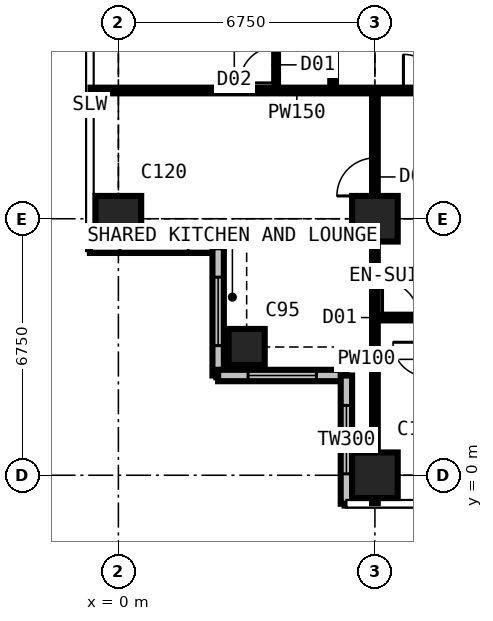
"""IFC4 building model, lengths in metres.
Left out: names, types, materials, properties, quantities, classifications, styles, units other than length and angle.
Written with IfcOpenShell. Run it as: python <this file> out.ifc"""

import sys

from ifc_helpers import new_model, si_unit, direction, frame, frame_2d, origin, origin_2d, place, context, subcontext, project, spatial, rectangle, extrude, element, fill, save


model = new_model("IFC4")
c1 = context("Model", 3, precision=1e-05, world=origin(), true_north=direction((0.0, 1.0)))
c2 = subcontext(c1, "Body", "Model", "MODEL_VIEW")
j1 = project(units=[si_unit("LENGTHUNIT", "METRE"), si_unit("PLANEANGLEUNIT", "RADIAN")], contexts=[c1])
p1 = place(None, origin())
s1 = spatial("IfcSite", under=j1, at=p1, CompositionType="ELEMENT")
p2 = place(p1, origin())
s2 = spatial("IfcBuilding", under=s1, at=p2, CompositionType="ELEMENT")
p3 = place(p2, frame((0.0, 0.0, 171.0)))
s3 = spatial("IfcBuildingStorey", under=s2, at=p3, CompositionType="ELEMENT", Elevation=171.0)
p4 = place(p3, frame((0.0, 6.75, 0.0), z_axis=(0.0, 0.0, 1.0), x_axis=(1.0, 0.0, 0.0)))
e1 = element("IfcColumn", 1, at=p4, inside=s3, PredefinedType="COLUMN", context=c2, shape_type="SweptSolid", body=[
    extrude(rectangle(XDim=1.2, YDim=1.2, at=origin_2d()), origin(), (0.0, 0.0, 1.0), 3.6),
])
p5 = place(p3, frame((3.375, 3.375, 0.0), z_axis=(0.0, 0.0, 1.0), x_axis=(1.0, 0.0, 0.0)))
e2 = element("IfcColumn", 2, at=p5, inside=s3, PredefinedType="COLUMN", context=c2, shape_type="SweptSolid", body=[
    extrude(rectangle(XDim=0.95, YDim=0.95, at=origin_2d()), origin(), (0.0, 0.0, 1.0), 3.6),
])
for number, where, z_axis, x_axis in (
    (3, (6.75, 0.0, 0.0), (0.0, 0.0, 1.0), (1.0, 0.0, 0.0)),
    (4, (6.75, 6.75, 0.0), (0.0, 0.0, 1.0), (1.0, 0.0, 0.0)),
):
    element("IfcColumn", number, at=place(p3, frame(where, z_axis=z_axis, x_axis=x_axis)), inside=s3, PredefinedType="COLUMN", context=c2, shape_type="SweptSolid", body=[
        extrude(rectangle(XDim=1.2, YDim=1.2, at=origin_2d()), origin(), (0.0, 0.0, 1.0), 3.6),
    ])
p6 = place(p3, frame((-0.75, 6.0, 0.0), z_axis=(0.0, 0.0, 1.0), x_axis=(1.0, 0.0, 0.0)))
e5 = element("IfcWall", 5, at=p6, inside=s3, PredefinedType="SOLIDWALL", context=c2, shape_type="SweptSolid", body=[
    extrude(rectangle(XDim=3.375, YDim=0.3, at=frame_2d((1.688, 0.0))), origin(), (0.0, 0.0, 1.0), 3.375),
])
p7 = place(p6, frame((0.788, 0.0, 0.6)))
e6 = element("IfcOpeningElement", 6, at=p7, cuts=e5, PredefinedType="OPENING", context=c2, shape_type="SweptSolid", body=[
    extrude(rectangle(XDim=1.8, YDim=2.1, at=frame_2d((0.9, 1.05))), frame((0.0, 0.16, 0.0), z_axis=(0.0, -1.0, 0.0), x_axis=(1.0, 0.0, 0.0)), (0.0, 0.0, 1.0), 0.32),
])
p8 = place(p3, frame((2.625, 6.0, 0.0), z_axis=(0.0, 0.0, 1.0), x_axis=(0.0, -1.0, 0.0)))
e7 = element("IfcWall", 7, at=p8, inside=s3, PredefinedType="SOLIDWALL", context=c2, shape_type="SweptSolid", body=[
    extrude(rectangle(XDim=3.375, YDim=0.3, at=frame_2d((1.688, 0.0))), origin(), (0.0, 0.0, 1.0), 3.375),
])
p9 = place(p8, frame((0.788, 0.0, 0.6)))
e8 = element("IfcOpeningElement", 8, at=p9, cuts=e7, PredefinedType="OPENING", context=c2, shape_type="SweptSolid", body=[
    extrude(rectangle(XDim=1.8, YDim=2.1, at=frame_2d((0.9, 1.05))), frame((0.0, 0.16, 0.0), z_axis=(0.0, -1.0, 0.0), x_axis=(1.0, 0.0, 0.0)), (0.0, 0.0, 1.0), 0.32),
])
p10 = place(p3, frame((2.625, 2.625, 0.0), z_axis=(0.0, 0.0, 1.0), x_axis=(1.0, 0.0, 0.0)))
e9 = element("IfcWall", 9, at=p10, inside=s3, PredefinedType="SOLIDWALL", context=c2, shape_type="SweptSolid", body=[
    extrude(rectangle(XDim=3.375, YDim=0.3, at=frame_2d((1.688, 0.0))), origin(), (0.0, 0.0, 1.0), 3.375),
])
p11 = place(p10, frame((0.788, 0.0, 0.6)))
e10 = element("IfcOpeningElement", 10, at=p11, cuts=e9, PredefinedType="OPENING", context=c2, shape_type="SweptSolid", body=[
    extrude(rectangle(XDim=1.8, YDim=2.1, at=frame_2d((0.9, 1.05))), frame((0.0, 0.16, 0.0), z_axis=(0.0, -1.0, 0.0), x_axis=(1.0, 0.0, 0.0)), (0.0, 0.0, 1.0), 0.32),
])
p12 = place(p3, frame((6.0, 2.625, 0.0), z_axis=(0.0, 0.0, 1.0), x_axis=(0.0, -1.0, 0.0)))
e11 = element("IfcWall", 11, at=p12, inside=s3, PredefinedType="SOLIDWALL", context=c2, shape_type="SweptSolid", body=[
    extrude(rectangle(XDim=3.375, YDim=0.3, at=frame_2d((1.688, 0.0))), origin(), (0.0, 0.0, 1.0), 3.375),
])
p13 = place(p12, frame((0.788, 0.0, 0.6)))
e12 = element("IfcOpeningElement", 12, at=p13, cuts=e11, PredefinedType="OPENING", context=c2, shape_type="SweptSolid", body=[
    extrude(rectangle(XDim=1.8, YDim=2.1, at=frame_2d((0.9, 1.05))), frame((0.0, 0.16, 0.0), z_axis=(0.0, -1.0, 0.0), x_axis=(1.0, 0.0, 0.0)), (0.0, 0.0, 1.0), 0.32),
])
p14 = place(p3, frame((-0.734, 10.125, 0.0), z_axis=(0.0, 0.0, 1.0), x_axis=(1.0, 0.0, 0.0)))
e13 = element("IfcWall", 13, at=p14, inside=s3, PredefinedType="PARTITIONING", context=c2, shape_type="SweptSolid", body=[
    extrude(rectangle(XDim=10.859, YDim=0.15, at=frame_2d((5.429, 0.0))), origin(), (0.0, 0.0, 1.0), 3.375),
])
p15 = place(p14, frame((8.234, 0.0, 0.0)))
e14 = element("IfcOpeningElement", 14, at=p15, cuts=e13, PredefinedType="OPENING", context=c2, shape_type="SweptSolid", body=[
    extrude(rectangle(XDim=0.95, YDim=2.2, at=frame_2d((0.475, 1.1))), frame((0.0, 0.085, 0.0), z_axis=(0.0, -1.0, 0.0), x_axis=(1.0, 0.0, 0.0)), (0.0, 0.0, 1.0), 0.17),
])
p16 = place(p3, frame((4.15, 10.125, 0.0), z_axis=(0.0, 0.0, 1.0), x_axis=(0.0, 1.0, 0.0)))
e15 = element("IfcWall", 15, at=p16, inside=s3, PredefinedType="PARTITIONING", context=c2, shape_type="SweptSolid", body=[
    extrude(rectangle(XDim=16.875, YDim=0.1, at=frame_2d((8.438, 0.0))), origin(), (0.0, 0.0, 1.0), 3.375),
])
p17 = place(p16, frame((0.2, 0.0, 0.0)))
e16 = element("IfcOpeningElement", 16, at=p17, cuts=e15, PredefinedType="OPENING", context=c2, shape_type="SweptSolid", body=[
    extrude(rectangle(XDim=0.95, YDim=2.2, at=frame_2d((0.475, 1.1))), frame((0.0, 0.06, 0.0), z_axis=(0.0, -1.0, 0.0), x_axis=(1.0, 0.0, 0.0)), (0.0, 0.0, 1.0), 0.12),
])
p18 = place(p16, frame((3.625, 0.0, 0.0)))
e17 = element("IfcOpeningElement", 17, at=p18, cuts=e15, PredefinedType="OPENING", context=c2, shape_type="SweptSolid", body=[
    extrude(rectangle(XDim=0.95, YDim=2.2, at=frame_2d((0.475, 1.1))), frame((0.0, 0.06, 0.0), z_axis=(0.0, -1.0, 0.0), x_axis=(1.0, 0.0, 0.0)), (0.0, 0.0, 1.0), 0.12),
])
p19 = place(p16, frame((7.0, 0.0, 0.0)))
e18 = element("IfcOpeningElement", 18, at=p19, cuts=e15, PredefinedType="OPENING", context=c2, shape_type="SweptSolid", body=[
    extrude(rectangle(XDim=0.95, YDim=2.2, at=frame_2d((0.475, 1.1))), frame((0.0, 0.06, 0.0), z_axis=(0.0, -1.0, 0.0), x_axis=(1.0, 0.0, 0.0)), (0.0, 0.0, 1.0), 0.12),
])
p20 = place(p16, frame((10.375, 0.0, 0.0)))
e19 = element("IfcOpeningElement", 19, at=p20, cuts=e15, PredefinedType="OPENING", context=c2, shape_type="SweptSolid", body=[
    extrude(rectangle(XDim=0.95, YDim=2.2, at=frame_2d((0.475, 1.1))), frame((0.0, 0.06, 0.0), z_axis=(0.0, -1.0, 0.0), x_axis=(1.0, 0.0, 0.0)), (0.0, 0.0, 1.0), 0.12),
])
p21 = place(p16, frame((13.75, 0.0, 0.0)))
e20 = element("IfcOpeningElement", 20, at=p21, cuts=e15, PredefinedType="OPENING", context=c2, shape_type="SweptSolid", body=[
    extrude(rectangle(XDim=0.95, YDim=2.2, at=frame_2d((0.475, 1.1))), frame((0.0, 0.06, 0.0), z_axis=(0.0, -1.0, 0.0), x_axis=(1.0, 0.0, 0.0)), (0.0, 0.0, 1.0), 0.12),
])
p22 = place(p3, frame((5.65, 10.125, 0.0), z_axis=(0.0, 0.0, 1.0), x_axis=(0.0, 1.0, 0.0)))
e21 = element("IfcWall", 21, at=p22, inside=s3, PredefinedType="PARTITIONING", context=c2, shape_type="SweptSolid", body=[
    extrude(rectangle(XDim=10.762, YDim=0.15, at=frame_2d((5.381, 0.0))), origin(), (0.0, 0.0, 1.0), 3.375),
])
p23 = place(p3, frame((6.75, -0.734, 0.0), z_axis=(0.0, 0.0, 1.0), x_axis=(0.0, 1.0, 0.0)))
e22 = element("IfcWall", 22, at=p23, inside=s3, PredefinedType="PARTITIONING", context=c2, shape_type="SweptSolid", body=[
    extrude(rectangle(XDim=10.859, YDim=0.15, at=frame_2d((5.429, 0.0))), origin(), (0.0, 0.0, 1.0), 2.877),
])
p24 = place(p23, frame((8.084, 0.0, 0.0)))
e23 = element("IfcOpeningElement", 23, at=p24, cuts=e22, PredefinedType="OPENING", context=c2, shape_type="SweptSolid", body=[
    extrude(rectangle(XDim=1.0, YDim=2.2, at=frame_2d((0.5, 1.1))), frame((0.0, 0.085, 0.0), z_axis=(0.0, -1.0, 0.0), x_axis=(1.0, 0.0, 0.0)), (0.0, 0.0, 1.0), 0.17),
])
p25 = place(p3, frame((6.75, 4.15, 0.0), z_axis=(0.0, 0.0, 1.0), x_axis=(1.0, 0.0, 0.0)))
e24 = element("IfcWall", 24, at=p25, inside=s3, PredefinedType="PARTITIONING", context=c2, shape_type="SweptSolid", body=[
    extrude(rectangle(XDim=20.25, YDim=0.15, at=frame_2d((10.125, 0.0))), origin(), (0.0, 0.0, 1.0), 3.375),
])
p26 = place(p25, frame((0.2, 0.0, 0.0)))
e25 = element("IfcOpeningElement", 25, at=p26, cuts=e24, PredefinedType="OPENING", context=c2, shape_type="SweptSolid", body=[
    extrude(rectangle(XDim=0.95, YDim=2.2, at=frame_2d((0.475, 1.1))), frame((0.0, 0.085, 0.0), z_axis=(0.0, -1.0, 0.0), x_axis=(1.0, 0.0, 0.0)), (0.0, 0.0, 1.0), 0.17),
])
p27 = place(p25, frame((3.625, 0.0, 0.0)))
e26 = element("IfcOpeningElement", 26, at=p27, cuts=e24, PredefinedType="OPENING", context=c2, shape_type="SweptSolid", body=[
    extrude(rectangle(XDim=0.95, YDim=2.2, at=frame_2d((0.475, 1.1))), frame((0.0, 0.085, 0.0), z_axis=(0.0, -1.0, 0.0), x_axis=(1.0, 0.0, 0.0)), (0.0, 0.0, 1.0), 0.17),
])
p28 = place(p25, frame((7.0, 0.0, 0.0)))
e27 = element("IfcOpeningElement", 27, at=p28, cuts=e24, PredefinedType="OPENING", context=c2, shape_type="SweptSolid", body=[
    extrude(rectangle(XDim=0.95, YDim=2.2, at=frame_2d((0.475, 1.1))), frame((0.0, 0.085, 0.0), z_axis=(0.0, -1.0, 0.0), x_axis=(1.0, 0.0, 0.0)), (0.0, 0.0, 1.0), 0.17),
])
p29 = place(p25, frame((10.375, 0.0, 0.0)))
e28 = element("IfcOpeningElement", 28, at=p29, cuts=e24, PredefinedType="OPENING", context=c2, shape_type="SweptSolid", body=[
    extrude(rectangle(XDim=0.95, YDim=2.2, at=frame_2d((0.475, 1.1))), frame((0.0, 0.085, 0.0), z_axis=(0.0, -1.0, 0.0), x_axis=(1.0, 0.0, 0.0)), (0.0, 0.0, 1.0), 0.17),
])
p30 = place(p25, frame((13.75, 0.0, 0.0)))
e29 = element("IfcOpeningElement", 29, at=p30, cuts=e24, PredefinedType="OPENING", context=c2, shape_type="SweptSolid", body=[
    extrude(rectangle(XDim=0.95, YDim=2.2, at=frame_2d((0.475, 1.1))), frame((0.0, 0.085, 0.0), z_axis=(0.0, -1.0, 0.0), x_axis=(1.0, 0.0, 0.0)), (0.0, 0.0, 1.0), 0.17),
])
p31 = place(p25, frame((17.125, 0.0, 0.0)))
e30 = element("IfcOpeningElement", 30, at=p31, cuts=e24, PredefinedType="OPENING", context=c2, shape_type="SweptSolid", body=[
    extrude(rectangle(XDim=0.95, YDim=2.2, at=frame_2d((0.475, 1.1))), frame((0.0, 0.085, 0.0), z_axis=(0.0, -1.0, 0.0), x_axis=(1.0, 0.0, 0.0)), (0.0, 0.0, 1.0), 0.17),
])
p32 = place(p7, origin())
e31 = element("IfcWindow", 31, at=p32, inside=s3, PartitioningType="SINGLE_PANEL", PredefinedType="WINDOW", context=c2, shape_type="SweptSolid", body=[
    extrude(rectangle(XDim=1.8, YDim=2.1, at=frame_2d((0.9, 1.05))), frame((0.0, 0.03, 0.0), z_axis=(0.0, -1.0, 0.0), x_axis=(1.0, 0.0, 0.0)), (0.0, 0.0, 1.0), 0.06),
])
fill(e6, e31)
p33 = place(p9, origin())
e32 = element("IfcWindow", 32, at=p33, inside=s3, PartitioningType="SINGLE_PANEL", PredefinedType="WINDOW", context=c2, shape_type="SweptSolid", body=[
    extrude(rectangle(XDim=1.8, YDim=2.1, at=frame_2d((0.9, 1.05))), frame((0.0, 0.03, 0.0), z_axis=(0.0, -1.0, 0.0), x_axis=(1.0, 0.0, 0.0)), (0.0, 0.0, 1.0), 0.06),
])
fill(e8, e32)
p34 = place(p11, origin())
e33 = element("IfcWindow", 33, at=p34, inside=s3, PartitioningType="SINGLE_PANEL", PredefinedType="WINDOW", context=c2, shape_type="SweptSolid", body=[
    extrude(rectangle(XDim=1.8, YDim=2.1, at=frame_2d((0.9, 1.05))), frame((0.0, 0.03, 0.0), z_axis=(0.0, -1.0, 0.0), x_axis=(1.0, 0.0, 0.0)), (0.0, 0.0, 1.0), 0.06),
])
fill(e10, e33)
p35 = place(p13, origin())
e34 = element("IfcWindow", 34, at=p35, inside=s3, PartitioningType="SINGLE_PANEL", PredefinedType="WINDOW", context=c2, shape_type="SweptSolid", body=[
    extrude(rectangle(XDim=1.8, YDim=2.1, at=frame_2d((0.9, 1.05))), frame((0.0, 0.03, 0.0), z_axis=(0.0, -1.0, 0.0), x_axis=(1.0, 0.0, 0.0)), (0.0, 0.0, 1.0), 0.06),
])
fill(e12, e34)
p36 = place(p26, origin())
e35 = element("IfcDoor", 35, at=p36, inside=s3, OperationType="SINGLE_SWING_LEFT", PredefinedType="DOOR", context=c2, shape_type="SweptSolid", body=[
    extrude(rectangle(XDim=0.95, YDim=2.2, at=frame_2d((0.475, 1.1))), frame((0.0, 0.025, 0.0), z_axis=(0.0, -1.0, 0.0), x_axis=(1.0, 0.0, 0.0)), (0.0, 0.0, 1.0), 0.05),
])
fill(e25, e35)
p37 = place(p24, origin())
e36 = element("IfcDoor", 36, at=p37, inside=s3, OperationType="SINGLE_SWING_LEFT", PredefinedType="DOOR", context=c2, shape_type="SweptSolid", body=[
    extrude(rectangle(XDim=1.0, YDim=2.2, at=frame_2d((0.5, 1.1))), frame((0.0, 0.025, 0.0), z_axis=(0.0, -1.0, 0.0), x_axis=(1.0, 0.0, 0.0)), (0.0, 0.0, 1.0), 0.05),
])
fill(e23, e36)
p38 = place(p17, origin())
e37 = element("IfcDoor", 37, at=p38, inside=s3, OperationType="SINGLE_SWING_LEFT", PredefinedType="DOOR", context=c2, shape_type="SweptSolid", body=[
    extrude(rectangle(XDim=0.95, YDim=2.2, at=frame_2d((0.475, 1.1))), frame((0.0, 0.025, 0.0), z_axis=(0.0, -1.0, 0.0), x_axis=(1.0, 0.0, 0.0)), (0.0, 0.0, 1.0), 0.05),
])
fill(e16, e37)
p39 = place(p15, origin())
e38 = element("IfcDoor", 38, at=p39, inside=s3, OperationType="SINGLE_SWING_LEFT", PredefinedType="DOOR", context=c2, shape_type="SweptSolid", body=[
    extrude(rectangle(XDim=0.95, YDim=2.2, at=frame_2d((0.475, 1.1))), frame((0.0, 0.025, 0.0), z_axis=(0.0, -1.0, 0.0), x_axis=(1.0, 0.0, 0.0)), (0.0, 0.0, 1.0), 0.05),
])
fill(e14, e38)
save(model, sys.argv[1])
